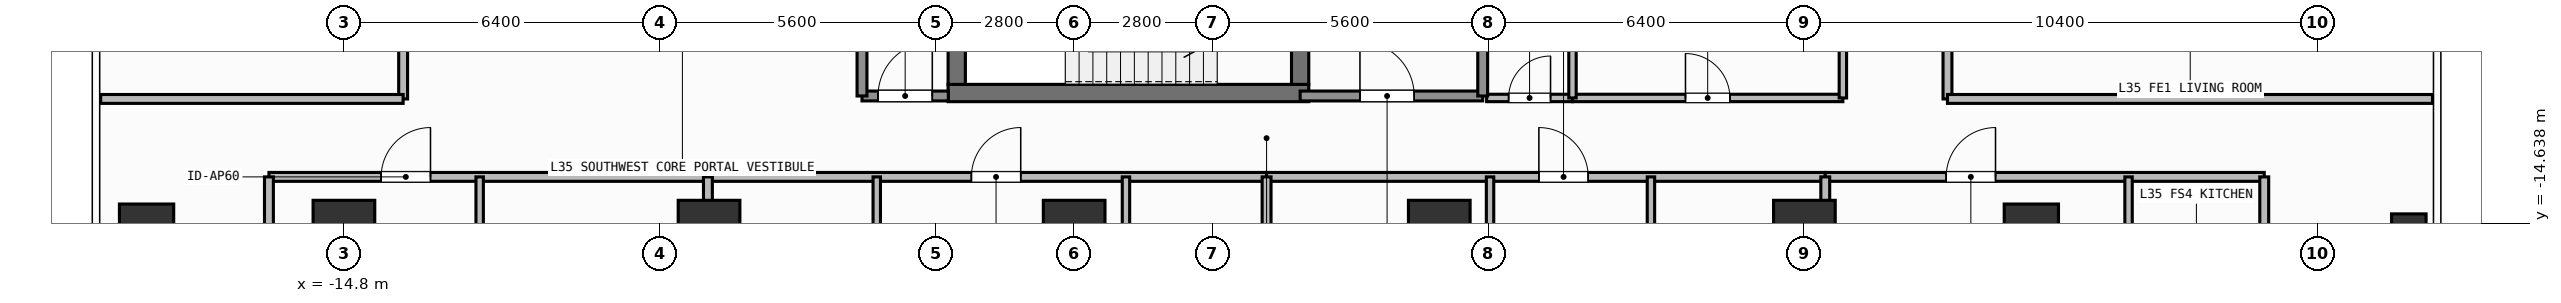
"""IFC4 building model, lengths in metres.
Left out: names, types, materials, properties, quantities, classifications, styles, units other than length and angle.
Written with IfcOpenShell. Run it as: python <this file> out.ifc"""

import sys

from ifc_helpers import new_model, si_unit, direction, frame, frame_2d, origin, origin_2d, place, context, subcontext, project, spatial, rectangle, hollow_rectangle, extrude, element, fill, save


model = new_model("IFC4")
c1 = context("Model", 3, precision=1e-05, world=origin(), true_north=direction((0.0, 1.0)))
c2 = subcontext(c1, "Body", "Model", "MODEL_VIEW")
j1 = project(units=[si_unit("LENGTHUNIT", "METRE"), si_unit("PLANEANGLEUNIT", "RADIAN")], contexts=[c1])
p1 = place(None, origin())
s1 = spatial("IfcSite", under=j1, at=p1, CompositionType="ELEMENT")
p2 = place(p1, origin())
s2 = spatial("IfcBuilding", under=s1, at=p2, CompositionType="ELEMENT")
p3 = place(p2, frame((0.0, 0.0, 140.7)))
s3 = spatial("IfcBuildingStorey", under=s2, at=p3, CompositionType="ELEMENT", Elevation=140.7)
p4 = place(p3, frame((-2.555, -12.0, 0.0), z_axis=(0.0, 0.0, 1.0), x_axis=(1.0, 0.0, 0.0)))
e1 = element("IfcWall", 1, at=p4, inside=s3, PredefinedType="SHEAR", context=c2, shape_type="SweptSolid", body=[
    extrude(rectangle(XDim=7.31, YDim=0.35, at=frame_2d((3.655, 0.0))), origin(), (0.0, 0.0, 1.0), 3.9),
])
p5 = place(p3, frame((-2.38, -11.825, 0.0), z_axis=(0.0, 0.0, 1.0), x_axis=(0.0, 1.0, 0.0)))
e2 = element("IfcWall", 2, at=p5, inside=s3, PredefinedType="SHEAR", context=c2, shape_type="SweptSolid", body=[
    extrude(rectangle(XDim=2.925, YDim=0.35, at=frame_2d((1.462, 0.0))), origin(), (0.0, 0.0, 1.0), 3.9),
])
p6 = place(p3, frame((4.58, -8.9, 0.0), z_axis=(0.0, 0.0, 1.0), x_axis=(0.0, -1.0, 0.0)))
e3 = element("IfcWall", 3, at=p6, inside=s3, PredefinedType="SHEAR", context=c2, shape_type="SweptSolid", body=[
    extrude(rectangle(XDim=2.925, YDim=0.35, at=frame_2d((1.462, 0.0))), origin(), (0.0, 0.0, 1.0), 3.9),
])
p7 = place(p6, frame((0.913, 0.0, 0.0)))
e4 = element("IfcOpeningElement", 4, at=p7, cuts=e3, PredefinedType="OPENING", context=c2, shape_type="SweptSolid", body=[
    extrude(rectangle(XDim=1.1, YDim=2.15, at=frame_2d((0.55, 1.075))), frame((0.0, 0.185, 0.0), z_axis=(0.0, -1.0, 0.0), x_axis=(1.0, 0.0, 0.0)), (0.0, 0.0, 1.0), 0.37),
])
for number, where, z_axis, x_axis in (
    (5, (-14.8, -14.8, 0.0), (0.0, 0.0, 1.0), (1.0, 0.0, 0.0)),
    (6, (-7.4, -14.8, 0.0), (0.0, 0.0, 1.0), (1.0, 0.0, 0.0)),
    (7, (0.0, -14.8, 0.0), (0.0, 0.0, 1.0), (1.0, 0.0, 0.0)),
    (8, (7.4, -14.8, 0.0), (0.0, 0.0, 1.0), (1.0, 0.0, 0.0)),
    (9, (14.8, -14.8, 0.0), (0.0, 0.0, 1.0), (1.0, 0.0, 0.0)),
):
    element("IfcColumn", number, at=place(p3, frame(where, z_axis=z_axis, x_axis=x_axis)), inside=s3, PredefinedType="COLUMN", context=c2, shape_type="SweptSolid", body=[
        extrude(rectangle(XDim=1.25, YDim=1.25, at=origin_2d()), origin(), (0.0, 0.0, 1.0), 3.9),
    ])
for number, where, z_axis, x_axis in (
    (10, (-18.8, -14.8, 0.0), (0.0, 0.0, 1.0), (1.0, 0.0, 0.0)),
    (11, (19.4, -14.8, 0.0), (0.0, 0.0, 1.0), (1.0, 0.0, 0.0)),
):
    element("IfcColumn", number, at=place(p3, frame(where, z_axis=z_axis, x_axis=x_axis)), inside=s3, PredefinedType="COLUMN", context=c2, shape_type="SweptSolid", body=[
        extrude(rectangle(XDim=1.1, YDim=1.1, at=origin_2d()), origin(), (0.0, 0.0, 1.0), 3.9),
    ])
p8 = place(p3, frame((27.05, -14.8, 0.0), z_axis=(0.0, 0.0, 1.0), x_axis=(1.0, 0.0, 0.0)))
e12 = element("IfcColumn", 12, at=p8, inside=s3, PredefinedType="COLUMN", context=c2, shape_type="SweptSolid", body=[
    extrude(hollow_rectangle(XDim=0.7, YDim=0.7, WallThickness=0.032, at=origin_2d()), origin(), (0.0, 0.0, 1.0), 3.9),
])
p9 = place(p3, frame((4.58, -12.06, 0.0), z_axis=(0.0, 0.0, 1.0), x_axis=(1.0, 0.0, 0.0)))
e13 = element("IfcWall", 13, at=p9, inside=s3, PredefinedType="SOLIDWALL", context=c2, shape_type="SweptSolid", body=[
    extrude(rectangle(XDim=3.7, YDim=0.2, at=frame_2d((1.85, 0.0))), origin(), (0.0, 0.0, 1.0), 3.68),
])
p10 = place(p9, frame((1.212, 0.0, 0.0)))
e14 = element("IfcOpeningElement", 14, at=p10, cuts=e13, PredefinedType="OPENING", context=c2, shape_type="SweptSolid", body=[
    extrude(rectangle(XDim=1.1, YDim=2.15, at=frame_2d((0.55, 1.075))), frame((0.0, 0.11, 0.0), z_axis=(0.0, -1.0, 0.0), x_axis=(1.0, 0.0, 0.0)), (0.0, 0.0, 1.0), 0.22),
])
p11 = place(p3, frame((-4.3, -12.06, 0.0), z_axis=(0.0, 0.0, 1.0), x_axis=(1.0, 0.0, 0.0)))
e15 = element("IfcWall", 15, at=p11, inside=s3, PredefinedType="SOLIDWALL", context=c2, shape_type="SweptSolid", body=[
    extrude(rectangle(XDim=1.75, YDim=0.2, at=frame_2d((0.875, 0.0))), origin(), (0.0, 0.0, 1.0), 3.68),
])
p12 = place(p11, frame((0.325, 0.0, 0.0)))
e16 = element("IfcOpeningElement", 16, at=p12, cuts=e15, PredefinedType="OPENING", context=c2, shape_type="SweptSolid", body=[
    extrude(rectangle(XDim=1.1, YDim=2.15, at=frame_2d((0.55, 1.075))), frame((0.0, 0.11, 0.0), z_axis=(0.0, -1.0, 0.0), x_axis=(1.0, 0.0, 0.0)), (0.0, 0.0, 1.0), 0.22),
])
p13 = place(p3, frame((8.36, -12.1, 0.0), z_axis=(0.0, 0.0, 1.0), x_axis=(1.0, 0.0, 0.0)))
e17 = element("IfcWall", 17, at=p13, inside=s3, PredefinedType="PARTITIONING", context=c2, shape_type="SweptSolid", body=[
    extrude(rectangle(XDim=1.74, YDim=0.15, at=frame_2d((0.87, 0.0))), origin(), (0.0, 0.0, 1.0), 3.68),
])
p14 = place(p13, frame((0.445, 0.0, 0.0)))
e18 = element("IfcOpeningElement", 18, at=p14, cuts=e17, PredefinedType="OPENING", context=c2, shape_type="SweptSolid", body=[
    extrude(rectangle(XDim=0.85, YDim=2.1, at=frame_2d((0.425, 1.05))), frame((0.0, 0.085, 0.0), z_axis=(0.0, -1.0, 0.0), x_axis=(1.0, 0.0, 0.0)), (0.0, 0.0, 1.0), 0.17),
])
p15 = place(p3, frame((10.1, -12.1, 0.0), z_axis=(0.0, 0.0, 1.0), x_axis=(1.0, 0.0, 0.0)))
e19 = element("IfcWall", 19, at=p15, inside=s3, PredefinedType="PARTITIONING", context=c2, shape_type="SweptSolid", body=[
    extrude(rectangle(XDim=5.48, YDim=0.15, at=frame_2d((2.74, 0.0))), origin(), (0.0, 0.0, 1.0), 3.68),
])
p16 = place(p15, frame((2.29, 0.0, 0.0)))
e20 = element("IfcOpeningElement", 20, at=p16, cuts=e19, PredefinedType="OPENING", context=c2, shape_type="SweptSolid", body=[
    extrude(rectangle(XDim=0.9, YDim=2.1, at=frame_2d((0.45, 1.05))), frame((0.0, 0.085, 0.0), z_axis=(0.0, -1.0, 0.0), x_axis=(1.0, 0.0, 0.0)), (0.0, 0.0, 1.0), 0.17),
])
p17 = place(p3, frame((-16.32, -13.7, 0.0), z_axis=(0.0, 0.0, 1.0), x_axis=(1.0, 0.0, 0.0)))
e21 = element("IfcWall", 21, at=p17, inside=s3, PredefinedType="PARTITIONING", context=c2, shape_type="SweptSolid", body=[
    extrude(rectangle(XDim=8.897, YDim=0.18, at=frame_2d((4.448, 0.0))), origin(), (0.0, 0.0, 1.0), 3.68),
])
p18 = place(p17, frame((2.274, 0.0, 0.0)))
e22 = element("IfcOpeningElement", 22, at=p18, cuts=e21, PredefinedType="OPENING", context=c2, shape_type="SweptSolid", body=[
    extrude(rectangle(XDim=1.0, YDim=2.2, at=frame_2d((0.5, 1.1))), frame((0.0, 0.1, 0.0), z_axis=(0.0, -1.0, 0.0), x_axis=(1.0, 0.0, 0.0)), (0.0, 0.0, 1.0), 0.2),
])
p19 = place(p3, frame((-12.049, -16.838, 0.0), z_axis=(0.0, 0.0, 1.0), x_axis=(0.0, 1.0, 0.0)))
e23 = element("IfcWall", 23, at=p19, inside=s3, PredefinedType="PARTITIONING", context=c2, shape_type="SweptSolid", body=[
    extrude(rectangle(XDim=3.138, YDim=0.15, at=frame_2d((1.569, 0.0))), origin(), (0.0, 0.0, 1.0), 3.68),
])
p20 = place(p19, frame((1.233, 0.0, 0.0)))
e24 = element("IfcOpeningElement", 24, at=p20, cuts=e23, PredefinedType="OPENING", context=c2, shape_type="SweptSolid", body=[
    extrude(rectangle(XDim=0.85, YDim=2.1, at=frame_2d((0.425, 1.05))), frame((0.0, 0.085, 0.0), z_axis=(0.0, -1.0, 0.0), x_axis=(1.0, 0.0, 0.0)), (0.0, 0.0, 1.0), 0.17),
])
p21 = place(p3, frame((-7.423, -13.7, 0.0), z_axis=(0.0, 0.0, 1.0), x_axis=(1.0, 0.0, 0.0)))
e25 = element("IfcWall", 25, at=p21, inside=s3, PredefinedType="PARTITIONING", context=c2, shape_type="SweptSolid", body=[
    extrude(rectangle(XDim=11.323, YDim=0.18, at=frame_2d((5.662, 0.0))), origin(), (0.0, 0.0, 1.0), 3.68),
])
p22 = place(p21, frame((5.34, 0.0, 0.0)))
e26 = element("IfcOpeningElement", 26, at=p22, cuts=e25, PredefinedType="OPENING", context=c2, shape_type="SweptSolid", body=[
    extrude(rectangle(XDim=1.0, YDim=2.2, at=frame_2d((0.5, 1.1))), frame((0.0, 0.1, 0.0), z_axis=(0.0, -1.0, 0.0), x_axis=(1.0, 0.0, 0.0)), (0.0, 0.0, 1.0), 0.2),
])
p23 = place(p3, frame((-4.001, -19.545, 0.0), z_axis=(0.0, 0.0, 1.0), x_axis=(0.0, 1.0, 0.0)))
e27 = element("IfcWall", 27, at=p23, inside=s3, PredefinedType="PARTITIONING", context=c2, shape_type="SweptSolid", body=[
    extrude(rectangle(XDim=5.845, YDim=0.15, at=frame_2d((2.922, 0.0))), origin(), (0.0, 0.0, 1.0), 3.68),
])
p24 = place(p23, frame((2.498, 0.0, 0.0)))
e28 = element("IfcOpeningElement", 28, at=p24, cuts=e27, PredefinedType="OPENING", context=c2, shape_type="SweptSolid", body=[
    extrude(rectangle(XDim=0.85, YDim=2.1, at=frame_2d((0.425, 1.05))), frame((0.0, 0.085, 0.0), z_axis=(0.0, -1.0, 0.0), x_axis=(1.0, 0.0, 0.0)), (0.0, 0.0, 1.0), 0.17),
])
p25 = place(p3, frame((1.05, -19.545, 0.0), z_axis=(0.0, 0.0, 1.0), x_axis=(0.0, 1.0, 0.0)))
e29 = element("IfcWall", 29, at=p25, inside=s3, PredefinedType="PARTITIONING", context=c2, shape_type="SweptSolid", body=[
    extrude(rectangle(XDim=5.845, YDim=0.15, at=frame_2d((2.922, 0.0))), origin(), (0.0, 0.0, 1.0), 3.68),
])
p26 = place(p25, frame((2.498, 0.0, 0.0)))
e30 = element("IfcOpeningElement", 30, at=p26, cuts=e29, PredefinedType="OPENING", context=c2, shape_type="SweptSolid", body=[
    extrude(rectangle(XDim=0.85, YDim=2.1, at=frame_2d((0.425, 1.05))), frame((0.0, 0.085, 0.0), z_axis=(0.0, -1.0, 0.0), x_axis=(1.0, 0.0, 0.0)), (0.0, 0.0, 1.0), 0.17),
])
p27 = place(p3, frame((3.9, -13.7, 0.0), z_axis=(0.0, 0.0, 1.0), x_axis=(1.0, 0.0, 0.0)))
e31 = element("IfcWall", 31, at=p27, inside=s3, PredefinedType="PARTITIONING", context=c2, shape_type="SweptSolid", body=[
    extrude(rectangle(XDim=11.323, YDim=0.18, at=frame_2d((5.662, 0.0))), origin(), (0.0, 0.0, 1.0), 3.68),
])
p28 = place(p27, frame((5.519, 0.0, 0.0)))
e32 = element("IfcOpeningElement", 32, at=p28, cuts=e31, PredefinedType="OPENING", context=c2, shape_type="SweptSolid", body=[
    extrude(rectangle(XDim=1.0, YDim=2.2, at=frame_2d((0.5, 1.1))), frame((0.0, 0.1, 0.0), z_axis=(0.0, -1.0, 0.0), x_axis=(1.0, 0.0, 0.0)), (0.0, 0.0, 1.0), 0.2),
])
p29 = place(p3, frame((8.429, -19.39, 0.0), z_axis=(0.0, 0.0, 1.0), x_axis=(0.0, 1.0, 0.0)))
e33 = element("IfcWall", 33, at=p29, inside=s3, PredefinedType="PARTITIONING", context=c2, shape_type="SweptSolid", body=[
    extrude(rectangle(XDim=5.69, YDim=0.15, at=frame_2d((2.845, 0.0))), origin(), (0.0, 0.0, 1.0), 3.68),
])
p30 = place(p29, frame((2.941, 0.0, 0.0)))
e34 = element("IfcOpeningElement", 34, at=p30, cuts=e33, PredefinedType="OPENING", context=c2, shape_type="SweptSolid", body=[
    extrude(rectangle(XDim=0.85, YDim=2.1, at=frame_2d((0.425, 1.05))), frame((0.0, 0.085, 0.0), z_axis=(0.0, -1.0, 0.0), x_axis=(1.0, 0.0, 0.0)), (0.0, 0.0, 1.0), 0.17),
])
p31 = place(p3, frame((11.69, -19.39, 0.0), z_axis=(0.0, 0.0, 1.0), x_axis=(0.0, 1.0, 0.0)))
e35 = element("IfcWall", 35, at=p31, inside=s3, PredefinedType="PARTITIONING", context=c2, shape_type="SweptSolid", body=[
    extrude(rectangle(XDim=5.69, YDim=0.15, at=frame_2d((2.845, 0.0))), origin(), (0.0, 0.0, 1.0), 3.68),
])
p32 = place(p31, frame((2.42, 0.0, 0.0)))
e36 = element("IfcOpeningElement", 36, at=p32, cuts=e35, PredefinedType="OPENING", context=c2, shape_type="SweptSolid", body=[
    extrude(rectangle(XDim=0.85, YDim=2.1, at=frame_2d((0.425, 1.05))), frame((0.0, 0.085, 0.0), z_axis=(0.0, -1.0, 0.0), x_axis=(1.0, 0.0, 0.0)), (0.0, 0.0, 1.0), 0.17),
])
p33 = place(p3, frame((15.223, -13.7, 0.0), z_axis=(0.0, 0.0, 1.0), x_axis=(1.0, 0.0, 0.0)))
e37 = element("IfcWall", 37, at=p33, inside=s3, PredefinedType="PARTITIONING", context=c2, shape_type="SweptSolid", body=[
    extrude(rectangle(XDim=8.897, YDim=0.18, at=frame_2d((4.449, 0.0))), origin(), (0.0, 0.0, 1.0), 3.68),
])
p34 = place(p33, frame((2.451, 0.0, 0.0)))
e38 = element("IfcOpeningElement", 38, at=p34, cuts=e37, PredefinedType="OPENING", context=c2, shape_type="SweptSolid", body=[
    extrude(rectangle(XDim=1.0, YDim=2.2, at=frame_2d((0.5, 1.1))), frame((0.0, 0.1, 0.0), z_axis=(0.0, -1.0, 0.0), x_axis=(1.0, 0.0, 0.0)), (0.0, 0.0, 1.0), 0.2),
])
p35 = place(p3, frame((21.37, -16.829, 0.0), z_axis=(0.0, 0.0, 1.0), x_axis=(0.0, 1.0, 0.0)))
e39 = element("IfcWall", 39, at=p35, inside=s3, PredefinedType="PARTITIONING", context=c2, shape_type="SweptSolid", body=[
    extrude(rectangle(XDim=3.129, YDim=0.15, at=frame_2d((1.564, 0.0))), origin(), (0.0, 0.0, 1.0), 3.68),
])
p36 = place(p35, frame((0.516, 0.0, 0.0)))
e40 = element("IfcOpeningElement", 40, at=p36, cuts=e39, PredefinedType="OPENING", context=c2, shape_type="SweptSolid", body=[
    extrude(rectangle(XDim=0.85, YDim=2.1, at=frame_2d((0.425, 1.05))), frame((0.0, 0.085, 0.0), z_axis=(0.0, -1.0, 0.0), x_axis=(1.0, 0.0, 0.0)), (0.0, 0.0, 1.0), 0.17),
])
p37 = place(p3, frame((-13.6, -12.12, 0.0), z_axis=(0.0, 0.0, 1.0), x_axis=(0.0, 1.0, 0.0)))
e41 = element("IfcWall", 41, at=p37, inside=s3, PredefinedType="PARTITIONING", context=c2, shape_type="SweptSolid", body=[
    extrude(rectangle(XDim=9.534, YDim=0.18, at=frame_2d((4.767, 0.0))), origin(), (0.0, 0.0, 1.0), 3.68),
])
p38 = place(p37, frame((1.41, 0.0, 0.0)))
e42 = element("IfcOpeningElement", 42, at=p38, cuts=e41, PredefinedType="OPENING", context=c2, shape_type="SweptSolid", body=[
    extrude(rectangle(XDim=1.0, YDim=2.2, at=frame_2d((0.5, 1.1))), frame((0.0, 0.1, 0.0), z_axis=(0.0, -1.0, 0.0), x_axis=(1.0, 0.0, 0.0)), (0.0, 0.0, 1.0), 0.2),
])
p39 = place(p3, frame((17.7, -12.12, 0.0), z_axis=(0.0, 0.0, 1.0), x_axis=(0.0, 1.0, 0.0)))
e43 = element("IfcWall", 43, at=p39, inside=s3, PredefinedType="PARTITIONING", context=c2, shape_type="SweptSolid", body=[
    extrude(rectangle(XDim=7.062, YDim=0.18, at=frame_2d((3.531, 0.0))), origin(), (0.0, 0.0, 1.0), 3.68),
])
p40 = place(p39, frame((1.237, 0.0, 0.0)))
e44 = element("IfcOpeningElement", 44, at=p40, cuts=e43, PredefinedType="OPENING", context=c2, shape_type="SweptSolid", body=[
    extrude(rectangle(XDim=1.0, YDim=2.2, at=frame_2d((0.5, 1.1))), frame((0.0, 0.1, 0.0), z_axis=(0.0, -1.0, 0.0), x_axis=(1.0, 0.0, 0.0)), (0.0, 0.0, 1.0), 0.2),
])
for number, where, z_axis, x_axis in (
    (45, (8.28, -12.06, 0.0), (0.0, 0.0, 1.0), (0.0, 1.0, 0.0)),
    (46, (-4.3, -12.06, 0.0), (0.0, 0.0, 1.0), (0.0, 1.0, 0.0)),
):
    element("IfcWall", number, at=place(p3, frame(where, z_axis=z_axis, x_axis=x_axis)), inside=s3, PredefinedType="SOLIDWALL", context=c2, shape_type="SweptSolid", body=[
        extrude(rectangle(XDim=3.185, YDim=0.2, at=frame_2d((1.593, 0.0))), origin(), (0.0, 0.0, 1.0), 3.68),
    ])
p41 = place(p3, frame((10.1, -12.1, 0.0), z_axis=(0.0, 0.0, 1.0), x_axis=(0.0, 1.0, 0.0)))
e47 = element("IfcWall", 47, at=p41, inside=s3, PredefinedType="PARTITIONING", context=c2, shape_type="SweptSolid", body=[
    extrude(rectangle(XDim=2.35, YDim=0.15, at=frame_2d((1.175, 0.0))), origin(), (0.0, 0.0, 1.0), 3.68),
])
p42 = place(p3, frame((15.58, -12.1, 0.0), z_axis=(0.0, 0.0, 1.0), x_axis=(0.0, 1.0, 0.0)))
e48 = element("IfcWall", 48, at=p42, inside=s3, PredefinedType="PARTITIONING", context=c2, shape_type="SweptSolid", body=[
    extrude(rectangle(XDim=6.25, YDim=0.15, at=frame_2d((3.125, 0.0))), origin(), (0.0, 0.0, 1.0), 3.68),
])
for number, where, z_axis, x_axis in (
    (49, (-16.32, -22.51, 0.0), (0.0, 0.0, 1.0), (0.0, 1.0, 0.0)),
    (50, (24.12, -22.51, 0.0), (0.0, 0.0, 1.0), (0.0, 1.0, 0.0)),
):
    element("IfcWall", number, at=place(p3, frame(where, z_axis=z_axis, x_axis=x_axis)), inside=s3, PredefinedType="PARTITIONING", context=c2, shape_type="SweptSolid", body=[
        extrude(rectangle(XDim=8.81, YDim=0.18, at=frame_2d((4.405, 0.0))), origin(), (0.0, 0.0, 1.0), 3.68),
    ])
p43 = place(p3, frame((-7.423, -23.63, 0.0), z_axis=(0.0, 0.0, 1.0), x_axis=(0.0, 1.0, 0.0)))
e51 = element("IfcWall", 51, at=p43, inside=s3, PredefinedType="PARTITIONING", context=c2, shape_type="SweptSolid", body=[
    extrude(rectangle(XDim=9.93, YDim=0.18, at=frame_2d((4.965, 0.0))), origin(), (0.0, 0.0, 1.0), 3.082),
])
for number, where, z_axis, x_axis in (
    (52, (3.9, -23.63, 0.0), (0.0, 0.0, 1.0), (0.0, 1.0, 0.0)),
    (53, (15.223, -23.63, 0.0), (0.0, 0.0, 1.0), (0.0, 1.0, 0.0)),
):
    element("IfcWall", number, at=place(p3, frame(where, z_axis=z_axis, x_axis=x_axis)), inside=s3, PredefinedType="PARTITIONING", context=c2, shape_type="SweptSolid", body=[
        extrude(rectangle(XDim=9.93, YDim=0.18, at=frame_2d((4.965, 0.0))), origin(), (0.0, 0.0, 1.0), 3.68),
    ])
p44 = place(p3, frame((-19.73, -12.12, 0.0), z_axis=(0.0, 0.0, 1.0), x_axis=(1.0, 0.0, 0.0)))
e54 = element("IfcWall", 54, at=p44, inside=s3, PredefinedType="PARTITIONING", context=c2, shape_type="SweptSolid", body=[
    extrude(rectangle(XDim=6.13, YDim=0.18, at=frame_2d((3.065, 0.0))), origin(), (0.0, 0.0, 1.0), 3.68),
])
p45 = place(p3, frame((17.7, -12.12, 0.0), z_axis=(0.0, 0.0, 1.0), x_axis=(1.0, 0.0, 0.0)))
e55 = element("IfcWall", 55, at=p45, inside=s3, PredefinedType="PARTITIONING", context=c2, shape_type="SweptSolid", body=[
    extrude(rectangle(XDim=9.83, YDim=0.18, at=frame_2d((4.915, 0.0))), origin(), (0.0, 0.0, 1.0), 3.68),
])
p46 = place(p10, origin())
e56 = element("IfcDoor", 56, at=p46, inside=s3, OperationType="SINGLE_SWING_LEFT", PredefinedType="DOOR", context=c2, shape_type="SweptSolid", body=[
    extrude(rectangle(XDim=1.1, YDim=2.15, at=frame_2d((0.55, 1.075))), frame((0.0, 0.025, 0.0), z_axis=(0.0, -1.0, 0.0), x_axis=(1.0, 0.0, 0.0)), (0.0, 0.0, 1.0), 0.05),
])
fill(e14, e56)
p47 = place(p12, origin())
e57 = element("IfcDoor", 57, at=p47, inside=s3, OperationType="SINGLE_SWING_RIGHT", PredefinedType="DOOR", context=c2, shape_type="SweptSolid", body=[
    extrude(rectangle(XDim=1.1, YDim=2.15, at=frame_2d((0.55, 1.075))), frame((0.0, 0.025, 0.0), z_axis=(0.0, -1.0, 0.0), x_axis=(1.0, 0.0, 0.0)), (0.0, 0.0, 1.0), 0.05),
])
fill(e16, e57)
p48 = place(p14, origin())
e58 = element("IfcDoor", 58, at=p48, inside=s3, OperationType="SINGLE_SWING_RIGHT", PredefinedType="DOOR", context=c2, shape_type="SweptSolid", body=[
    extrude(rectangle(XDim=0.85, YDim=2.1, at=frame_2d((0.425, 1.05))), frame((0.0, 0.025, 0.0), z_axis=(0.0, -1.0, 0.0), x_axis=(1.0, 0.0, 0.0)), (0.0, 0.0, 1.0), 0.05),
])
fill(e18, e58)
p49 = place(p16, origin())
e59 = element("IfcDoor", 59, at=p49, inside=s3, OperationType="SINGLE_SWING_LEFT", PredefinedType="DOOR", context=c2, shape_type="SweptSolid", body=[
    extrude(rectangle(XDim=0.9, YDim=2.1, at=frame_2d((0.45, 1.05))), frame((0.0, 0.025, 0.0), z_axis=(0.0, -1.0, 0.0), x_axis=(1.0, 0.0, 0.0)), (0.0, 0.0, 1.0), 0.05),
])
fill(e20, e59)
p50 = place(p18, origin())
e60 = element("IfcDoor", 60, at=p50, inside=s3, OperationType="SINGLE_SWING_RIGHT", PredefinedType="DOOR", context=c2, shape_type="SweptSolid", body=[
    extrude(rectangle(XDim=1.0, YDim=2.2, at=frame_2d((0.5, 1.1))), frame((0.0, 0.025, 0.0), z_axis=(0.0, -1.0, 0.0), x_axis=(1.0, 0.0, 0.0)), (0.0, 0.0, 1.0), 0.05),
])
fill(e22, e60)
p51 = place(p22, origin())
e61 = element("IfcDoor", 61, at=p51, inside=s3, OperationType="SINGLE_SWING_RIGHT", PredefinedType="DOOR", context=c2, shape_type="SweptSolid", body=[
    extrude(rectangle(XDim=1.0, YDim=2.2, at=frame_2d((0.5, 1.1))), frame((0.0, 0.025, 0.0), z_axis=(0.0, -1.0, 0.0), x_axis=(1.0, 0.0, 0.0)), (0.0, 0.0, 1.0), 0.05),
])
fill(e26, e61)
p52 = place(p28, origin())
e62 = element("IfcDoor", 62, at=p52, inside=s3, OperationType="SINGLE_SWING_LEFT", PredefinedType="DOOR", context=c2, shape_type="SweptSolid", body=[
    extrude(rectangle(XDim=1.0, YDim=2.2, at=frame_2d((0.5, 1.1))), frame((0.0, 0.025, 0.0), z_axis=(0.0, -1.0, 0.0), x_axis=(1.0, 0.0, 0.0)), (0.0, 0.0, 1.0), 0.05),
])
fill(e32, e62)
p53 = place(p34, origin())
e63 = element("IfcDoor", 63, at=p53, inside=s3, OperationType="SINGLE_SWING_RIGHT", PredefinedType="DOOR", context=c2, shape_type="SweptSolid", body=[
    extrude(rectangle(XDim=1.0, YDim=2.2, at=frame_2d((0.5, 1.1))), frame((0.0, 0.025, 0.0), z_axis=(0.0, -1.0, 0.0), x_axis=(1.0, 0.0, 0.0)), (0.0, 0.0, 1.0), 0.05),
])
fill(e38, e63)
save(model, sys.argv[1])
